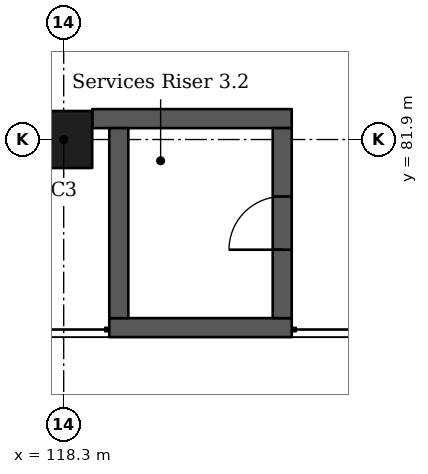
"""IFC4 building model, lengths in metres.
Left out: names, types, materials, properties, quantities, classifications, styles, units other than length and angle.
Written with IfcOpenShell. Run it as: python <this file> out.ifc"""

import sys

from ifc_helpers import new_model, si_unit, direction, frame, frame_2d, origin, origin_2d, place, context, subcontext, project, spatial, rectangle, extrude, element, fill, save


model = new_model("IFC4")
c1 = context("Model", 3, precision=1e-05, world=origin(), true_north=direction((0.0, 1.0)))
c2 = subcontext(c1, "Body", "Model", "MODEL_VIEW")
j1 = project(units=[si_unit("LENGTHUNIT", "METRE"), si_unit("PLANEANGLEUNIT", "RADIAN")], contexts=[c1])
p1 = place(None, origin())
s1 = spatial("IfcSite", under=j1, at=p1, CompositionType="ELEMENT")
p2 = place(p1, origin())
s2 = spatial("IfcBuilding", under=s1, at=p2, CompositionType="ELEMENT")
p3 = place(p2, frame((0.0, 0.0, 10.92)))
s3 = spatial("IfcBuildingStorey", under=s2, at=p3, CompositionType="ELEMENT", Elevation=10.92)
p4 = place(p3, frame((118.3, 81.9, 0.0), z_axis=(0.0, 0.0, 1.0), x_axis=(1.0, 0.0, 0.0)))
e1 = element("IfcColumn", 1, at=p4, inside=s3, PredefinedType="COLUMN", context=c2, shape_type="SweptSolid", body=[
    extrude(rectangle(XDim=0.75, YDim=0.75, at=origin_2d()), origin(), (0.0, 0.0, 1.0), 4.55),
])
p5 = place(p3, frame((121.3, 79.425, 0.0), z_axis=(0.0, 0.0, 1.0), x_axis=(-1.0, 0.0, 0.0)))
e2 = element("IfcWall", 2, at=p5, inside=s3, PredefinedType="SHEAR", context=c2, shape_type="SweptSolid", body=[
    extrude(rectangle(XDim=2.4, YDim=0.25, at=frame_2d((1.2, 0.0))), origin(), (0.0, 0.0, 1.0), 4.55),
])
p6 = place(p3, frame((121.3, 82.175, 0.0), z_axis=(0.0, 0.0, 1.0), x_axis=(-1.0, 0.0, 0.0)))
e3 = element("IfcWall", 3, at=p6, inside=s3, PredefinedType="SHEAR", context=c2, shape_type="SweptSolid", body=[
    extrude(rectangle(XDim=2.625, YDim=0.25, at=frame_2d((1.312, 0.0))), origin(), (0.0, 0.0, 1.0), 4.55),
])
p7 = place(p3, frame((119.025, 82.05, 0.0), z_axis=(0.0, 0.0, 1.0), x_axis=(0.0, -1.0, 0.0)))
e4 = element("IfcWall", 4, at=p7, inside=s3, PredefinedType="SHEAR", context=c2, shape_type="SweptSolid", body=[
    extrude(rectangle(XDim=2.5, YDim=0.25, at=frame_2d((1.25, 0.0))), origin(), (0.0, 0.0, 1.0), 4.55),
])
p8 = place(p3, frame((121.175, 82.05, 0.0), z_axis=(0.0, 0.0, 1.0), x_axis=(0.0, -1.0, 0.0)))
e5 = element("IfcWall", 5, at=p8, inside=s3, PredefinedType="SHEAR", context=c2, shape_type="SweptSolid", body=[
    extrude(rectangle(XDim=2.5, YDim=0.25, at=frame_2d((1.25, 0.0))), origin(), (0.0, 0.0, 1.0), 4.55),
])
p9 = place(p8, frame((0.9, 0.0, 0.0)))
e6 = element("IfcOpeningElement", 6, at=p9, cuts=e5, PredefinedType="OPENING", context=c2, shape_type="SweptSolid", body=[
    extrude(rectangle(XDim=0.7, YDim=2.1, at=frame_2d((0.35, 1.05))), frame((0.0, 0.135, 0.0), z_axis=(0.0, -1.0, 0.0), x_axis=(1.0, 0.0, 0.0)), (0.0, 0.0, 1.0), 0.27),
])
p10 = place(p9, origin())
e7 = element("IfcDoor", 7, at=p10, inside=s3, OperationType="SINGLE_SWING_RIGHT", PredefinedType="DOOR", context=c2, shape_type="SweptSolid", body=[
    extrude(rectangle(XDim=0.7, YDim=2.1, at=frame_2d((0.35, 1.05))), frame((0.0, 0.025, 0.0), z_axis=(0.0, -1.0, 0.0), x_axis=(1.0, 0.0, 0.0)), (0.0, 0.0, 1.0), 0.05),
])
fill(e6, e7)
save(model, sys.argv[1])
